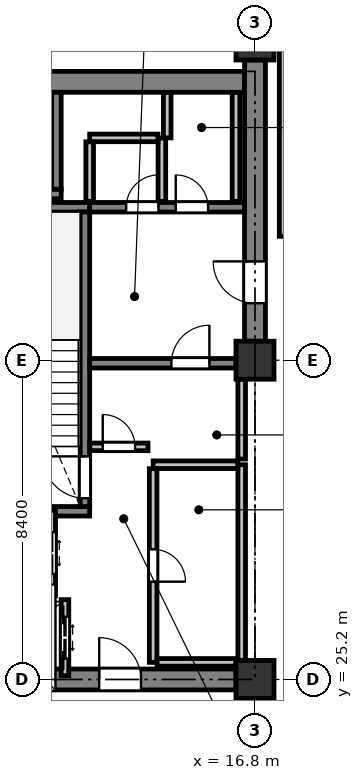
"""IFC4 building model, lengths in metres.
Left out: names, types, materials, properties, quantities, classifications, styles, units other than length and angle.
Written with IfcOpenShell. Run it as: python <this file> out.ifc"""

import sys

from ifc_helpers import new_model, si_unit, direction, frame, frame_2d, origin, origin_2d, place, context, subcontext, project, spatial, rectangle, extrude, element, fill, save


model = new_model("IFC4")
c1 = context("Model", 3, precision=1e-05, world=origin(), true_north=direction((0.0, 1.0)))
c2 = subcontext(c1, "Body", "Model", "MODEL_VIEW")
j1 = project(units=[si_unit("LENGTHUNIT", "METRE"), si_unit("PLANEANGLEUNIT", "RADIAN")], contexts=[c1])
p1 = place(None, origin())
s1 = spatial("IfcSite", under=j1, at=p1, CompositionType="ELEMENT")
p2 = place(p1, origin())
s2 = spatial("IfcBuilding", under=s1, at=p2, CompositionType="ELEMENT")
p3 = place(p2, frame((0.0, 0.0, 171.4)))
s3 = spatial("IfcBuildingStorey", under=s2, at=p3, CompositionType="ELEMENT", Elevation=171.4)
for number, where, z_axis, x_axis in (
    (1, (16.8, 25.2, 0.0), (0.0, 0.0, 1.0), (1.0, 0.0, 0.0)),
    (2, (16.8, 33.6, 0.0), (0.0, 0.0, 1.0), (1.0, 0.0, 0.0)),
    (3, (16.8, 42.0, 0.0), (0.0, 0.0, 1.0), (1.0, 0.0, 0.0)),
):
    element("IfcColumn", number, at=place(p3, frame(where, z_axis=z_axis, x_axis=x_axis)), inside=s3, PredefinedType="COLUMN", context=c2, shape_type="SweptSolid", body=[
        extrude(rectangle(XDim=1.0, YDim=1.0, at=origin_2d()), origin(), (0.0, 0.0, 1.0), 4.1),
    ])
p4 = place(p3, frame((8.675, 40.925, 0.0), z_axis=(0.0, 0.0, 1.0), x_axis=(1.0, 0.0, 0.0)))
e4 = element("IfcWall", 4, at=p4, inside=s3, PredefinedType="SHEAR", context=c2, shape_type="SweptSolid", body=[
    extrude(rectangle(XDim=7.85, YDim=0.55, at=frame_2d((3.925, 0.0))), origin(), (0.0, 0.0, 1.0), 3.825),
])
p5 = place(p3, frame((16.8, 34.1, 0.0), z_axis=(0.0, 0.0, 1.0), x_axis=(0.0, 1.0, 0.0)))
e5 = element("IfcWall", 5, at=p5, inside=s3, PredefinedType="SHEAR", context=c2, shape_type="SweptSolid", body=[
    extrude(rectangle(XDim=7.4, YDim=0.55, at=frame_2d((3.7, 0.0))), origin(), (0.0, 0.0, 1.0), 3.825),
])
p6 = place(p5, frame((1.0, 0.0, 0.0)))
e6 = element("IfcOpeningElement", 6, at=p6, cuts=e5, PredefinedType="OPENING", context=c2, shape_type="SweptSolid", body=[
    extrude(rectangle(XDim=1.1, YDim=2.15, at=frame_2d((0.55, 1.075))), frame((0.0, 0.285, 0.0), z_axis=(0.0, -1.0, 0.0), x_axis=(1.0, 0.0, 0.0)), (0.0, 0.0, 1.0), 0.57),
])
p7 = place(p3, frame((8.9, 25.2, 0.0), z_axis=(0.0, 0.0, 1.0), x_axis=(1.0, 0.0, 0.0)))
e7 = element("IfcWall", 7, at=p7, inside=s3, PredefinedType="SHEAR", context=c2, shape_type="SweptSolid", body=[
    extrude(rectangle(XDim=7.4, YDim=0.55, at=frame_2d((3.7, 0.0))), origin(), (0.0, 0.0, 1.0), 3.825),
])
p8 = place(p7, frame((3.8, 0.0, 0.0)))
e8 = element("IfcOpeningElement", 8, at=p8, cuts=e7, PredefinedType="OPENING", context=c2, shape_type="SweptSolid", body=[
    extrude(rectangle(XDim=1.1, YDim=2.15, at=frame_2d((0.55, 1.075))), frame((0.0, 0.285, 0.0), z_axis=(0.0, -1.0, 0.0), x_axis=(1.0, 0.0, 0.0)), (0.0, 0.0, 1.0), 0.57),
])
for number, where, z_axis, x_axis in (
    (9, (12.45, 29.625, 0.0), (0.0, 0.0, 1.0), (-1.0, 0.0, 0.0)),
    (10, (12.45, 37.625, 0.0), (0.0, 0.0, 1.0), (-1.0, 0.0, 0.0)),
):
    element("IfcWall", number, at=place(p3, frame(where, z_axis=z_axis, x_axis=x_axis)), inside=s3, PredefinedType="SHEAR", context=c2, shape_type="SweptSolid", body=[
        extrude(rectangle(XDim=3.75, YDim=0.25, at=frame_2d((1.875, 0.0))), origin(), (0.0, 0.0, 1.0), 3.825),
    ])
p9 = place(p3, frame((12.325, 29.75, 0.0), z_axis=(0.0, 0.0, 1.0), x_axis=(0.0, 1.0, 0.0)))
e11 = element("IfcWall", 11, at=p9, inside=s3, PredefinedType="SHEAR", context=c2, shape_type="SweptSolid", body=[
    extrude(rectangle(XDim=7.75, YDim=0.25, at=frame_2d((3.875, 0.0))), origin(), (0.0, 0.0, 1.0), 3.825),
])
p10 = place(p9, frame((0.22, 0.0, 0.0)))
e12 = element("IfcOpeningElement", 12, at=p10, cuts=e11, PredefinedType="OPENING", context=c2, shape_type="SweptSolid", body=[
    extrude(rectangle(XDim=1.1, YDim=2.15, at=frame_2d((0.55, 1.075))), frame((0.0, 0.135, 0.0), z_axis=(0.0, -1.0, 0.0), x_axis=(1.0, 0.0, 0.0)), (0.0, 0.0, 1.0), 0.27),
])
p11 = place(p3, frame((8.675, 37.975, 0.0), z_axis=(0.0, 0.0, 1.0), x_axis=(1.0, 0.0, 0.0)))
e13 = element("IfcWall", 13, at=p11, inside=s3, PredefinedType="SHEAR", context=c2, shape_type="SweptSolid", body=[
    extrude(rectangle(XDim=3.025, YDim=0.25, at=frame_2d((1.512, 0.0))), origin(), (0.0, 0.0, 1.0), 3.825),
])
p12 = place(p3, frame((11.575, 38.1, 0.0), z_axis=(0.0, 0.0, 1.0), x_axis=(0.0, 1.0, 0.0)))
e14 = element("IfcWall", 14, at=p12, inside=s3, PredefinedType="SHEAR", context=c2, shape_type="SweptSolid", body=[
    extrude(rectangle(XDim=2.55, YDim=0.25, at=frame_2d((1.275, 0.0))), origin(), (0.0, 0.0, 1.0), 3.825),
])
p13 = place(p3, frame((12.45, 33.52, 0.0), z_axis=(0.0, 0.0, 1.0), x_axis=(1.0, 0.0, 0.0)))
e15 = element("IfcWall", 15, at=p13, inside=s3, PredefinedType="SHEAR", context=c2, shape_type="SweptSolid", body=[
    extrude(rectangle(XDim=3.85, YDim=0.25, at=frame_2d((1.925, 0.0))), origin(), (0.0, 0.0, 1.0), 3.825),
])
p14 = place(p13, frame((2.15, 0.0, 0.0)))
e16 = element("IfcOpeningElement", 16, at=p14, cuts=e15, PredefinedType="OPENING", context=c2, shape_type="SweptSolid", body=[
    extrude(rectangle(XDim=1.0, YDim=2.15, at=frame_2d((0.5, 1.075))), frame((0.0, 0.135, 0.0), z_axis=(0.0, -1.0, 0.0), x_axis=(1.0, 0.0, 0.0)), (0.0, 0.0, 1.0), 0.27),
])
p15 = place(p3, frame((12.45, 37.625, 0.0), z_axis=(0.0, 0.0, 1.0), x_axis=(1.0, 0.0, 0.0)))
e17 = element("IfcWall", 17, at=p15, inside=s3, PredefinedType="SHEAR", context=c2, shape_type="SweptSolid", body=[
    extrude(rectangle(XDim=4.075, YDim=0.25, at=frame_2d((2.038, 0.0))), origin(), (0.0, 0.0, 1.0), 3.825),
])
p16 = place(p15, frame((0.96, 0.0, 0.0)))
e18 = element("IfcOpeningElement", 18, at=p16, cuts=e17, PredefinedType="OPENING", context=c2, shape_type="SweptSolid", body=[
    extrude(rectangle(XDim=0.85, YDim=2.15, at=frame_2d((0.425, 1.075))), frame((0.0, 0.135, 0.0), z_axis=(0.0, -1.0, 0.0), x_axis=(1.0, 0.0, 0.0)), (0.0, 0.0, 1.0), 0.27),
])
p17 = place(p15, frame((2.264, 0.0, 0.0)))
e19 = element("IfcOpeningElement", 19, at=p17, cuts=e17, PredefinedType="OPENING", context=c2, shape_type="SweptSolid", body=[
    extrude(rectangle(XDim=0.85, YDim=2.15, at=frame_2d((0.425, 1.075))), frame((0.0, 0.135, 0.0), z_axis=(0.0, -1.0, 0.0), x_axis=(1.0, 0.0, 0.0)), (0.0, 0.0, 1.0), 0.27),
])
p18 = place(p3, frame((11.45, 27.4, 0.0), z_axis=(0.0, 0.0, 1.0), x_axis=(0.0, 1.0, 0.0)))
e20 = element("IfcWall", 20, at=p18, inside=s3, PredefinedType="PARTITIONING", context=c2, shape_type="SweptSolid", body=[
    extrude(rectangle(XDim=2.25, YDim=0.2, at=frame_2d((1.125, 0.0))), origin(), (0.0, 0.0, 1.0), 3.825),
])
p19 = place(p18, frame((0.575, 0.0, 0.0)))
e21 = element("IfcOpeningElement", 21, at=p19, cuts=e20, PredefinedType="OPENING", context=c2, shape_type="SweptSolid", body=[
    extrude(rectangle(XDim=1.1, YDim=2.2, at=frame_2d((0.55, 1.1))), frame((0.0, 0.11, 0.0), z_axis=(0.0, -1.0, 0.0), x_axis=(1.0, 0.0, 0.0)), (0.0, 0.0, 1.0), 0.22),
])
p20 = place(p3, frame((11.8, 25.3, 0.0), z_axis=(0.0, 0.0, 1.0), x_axis=(0.0, 1.0, 0.0)))
e22 = element("IfcWall", 22, at=p20, inside=s3, PredefinedType="PARTITIONING", context=c2, shape_type="SweptSolid", body=[
    extrude(rectangle(XDim=2.0, YDim=0.2, at=frame_2d((1.0, 0.0))), origin(), (0.0, 0.0, 1.0), 3.825),
])
p21 = place(p20, frame((0.45, 0.0, 0.0)))
e23 = element("IfcOpeningElement", 23, at=p21, cuts=e22, PredefinedType="OPENING", context=c2, shape_type="SweptSolid", body=[
    extrude(rectangle(XDim=1.1, YDim=2.2, at=frame_2d((0.55, 1.1))), frame((0.0, 0.11, 0.0), z_axis=(0.0, -1.0, 0.0), x_axis=(1.0, 0.0, 0.0)), (0.0, 0.0, 1.0), 0.22),
])
p22 = place(p3, frame((16.45, 25.705, 0.0), z_axis=(0.0, 0.0, 1.0), x_axis=(0.0, 1.0, 0.0)))
e24 = element("IfcWall", 24, at=p22, inside=s3, PredefinedType="PARTITIONING", context=c2, shape_type="SweptSolid", body=[
    extrude(rectangle(XDim=5.145, YDim=0.2, at=frame_2d((2.573, 0.0))), origin(), (0.0, 0.0, 1.0), 3.825),
])
p23 = place(p3, frame((16.346, 30.85, 0.0), z_axis=(0.0, 0.0, 1.0), x_axis=(-1.0, 0.0, 0.0)))
e25 = element("IfcWall", 25, at=p23, inside=s3, PredefinedType="PARTITIONING", context=c2, shape_type="SweptSolid", body=[
    extrude(rectangle(XDim=2.226, YDim=0.2, at=frame_2d((1.113, 0.0))), origin(), (0.0, 0.0, 1.0), 3.825),
])
p24 = place(p3, frame((14.12, 30.746, 0.0), z_axis=(0.0, 0.0, 1.0), x_axis=(0.0, -1.0, 0.0)))
e26 = element("IfcWall", 26, at=p24, inside=s3, PredefinedType="PARTITIONING", context=c2, shape_type="SweptSolid", body=[
    extrude(rectangle(XDim=5.096, YDim=0.2, at=frame_2d((2.548, 0.0))), origin(), (0.0, 0.0, 1.0), 3.825),
])
p25 = place(p24, frame((2.123, 0.0, 0.0)))
e27 = element("IfcOpeningElement", 27, at=p25, cuts=e26, PredefinedType="OPENING", context=c2, shape_type="SweptSolid", body=[
    extrude(rectangle(XDim=0.85, YDim=2.15, at=frame_2d((0.425, 1.075))), frame((0.0, 0.11, 0.0), z_axis=(0.0, -1.0, 0.0), x_axis=(1.0, 0.0, 0.0)), (0.0, 0.0, 1.0), 0.22),
])
p26 = place(p3, frame((14.224, 25.65, 0.0), z_axis=(0.0, 0.0, 1.0), x_axis=(1.0, 0.0, 0.0)))
e28 = element("IfcWall", 28, at=p26, inside=s3, PredefinedType="PARTITIONING", context=c2, shape_type="SweptSolid", body=[
    extrude(rectangle(XDim=2.071, YDim=0.2, at=frame_2d((1.035, 0.0))), origin(), (0.0, 0.0, 1.0), 3.825),
])
p27 = place(p3, frame((12.454, 31.32, 0.0), z_axis=(0.0, 0.0, 1.0), x_axis=(0.999999949061, -0.000319182876, 0.0)))
e29 = element("IfcWall", 29, at=p27, inside=s3, PredefinedType="PARTITIONING", context=c2, shape_type="SweptSolid", body=[
    extrude(rectangle(XDim=1.53, YDim=0.2, at=frame_2d((0.765, 0.0))), origin(), (0.0, 0.0, 1.0), 3.825),
])
p28 = place(p27, frame((0.34, 0.0, 0.0)))
e30 = element("IfcOpeningElement", 30, at=p28, cuts=e29, PredefinedType="OPENING", context=c2, shape_type="SweptSolid", body=[
    extrude(rectangle(XDim=0.85, YDim=2.15, at=frame_2d((0.425, 1.075))), frame((0.0, 0.11, 0.0), z_axis=(0.0, -1.0, 0.0), x_axis=(1.0, 0.0, 0.0)), (0.0, 0.0, 1.0), 0.22),
])
p29 = place(p3, frame((16.45, 31.0, 0.0), z_axis=(0.0, 0.0, 1.0), x_axis=(0.0, 1.0, 0.0)))
e31 = element("IfcWall", 31, at=p29, inside=s3, PredefinedType="PARTITIONING", context=c2, shape_type="SweptSolid", body=[
    extrude(rectangle(XDim=2.095, YDim=0.2, at=frame_2d((1.047, 0.0))), origin(), (0.0, 0.0, 1.0), 3.825),
])
p30 = place(p3, frame((14.35, 37.78, 0.0), z_axis=(0.0, 0.0, 1.0), x_axis=(0.0, 1.0, 0.0)))
e32 = element("IfcWall", 32, at=p30, inside=s3, PredefinedType="PARTITIONING", context=c2, shape_type="SweptSolid", body=[
    extrude(rectangle(XDim=1.67, YDim=0.2, at=frame_2d((0.835, 0.0))), origin(), (0.0, 0.0, 1.0), 2.875),
])
p31 = place(p3, frame((14.246, 39.45, 0.0), z_axis=(0.0, 0.0, 1.0), x_axis=(-1.0, 0.0, 0.0)))
e33 = element("IfcWall", 33, at=p31, inside=s3, PredefinedType="PARTITIONING", context=c2, shape_type="SweptSolid", body=[
    extrude(rectangle(XDim=1.796, YDim=0.2, at=frame_2d((0.898, 0.0))), origin(), (0.0, 0.0, 1.0), 2.875),
])
p32 = place(p3, frame((12.45, 39.346, 0.0), z_axis=(0.0, 0.0, 1.0), x_axis=(0.0, -1.0, 0.0)))
e34 = element("IfcWall", 34, at=p32, inside=s3, PredefinedType="PARTITIONING", context=c2, shape_type="SweptSolid", body=[
    extrude(rectangle(XDim=1.566, YDim=0.2, at=frame_2d((0.783, 0.0))), origin(), (0.0, 0.0, 1.0), 2.875),
])
p33 = place(p3, frame((16.3, 37.78, 0.0), z_axis=(0.0, 0.0, 1.0), x_axis=(0.0, 1.0, 0.0)))
e35 = element("IfcWall", 35, at=p33, inside=s3, PredefinedType="PARTITIONING", context=c2, shape_type="SweptSolid", body=[
    extrude(rectangle(XDim=2.866, YDim=0.2, at=frame_2d((1.433, 0.0))), origin(), (0.0, 0.0, 1.0), 2.875),
])
p34 = place(p3, frame((14.49, 40.646, 0.0), z_axis=(0.0, 0.0, 1.0), x_axis=(0.0, -1.0, 0.0)))
e36 = element("IfcWall", 36, at=p34, inside=s3, PredefinedType="PARTITIONING", context=c2, shape_type="SweptSolid", body=[
    extrude(rectangle(XDim=1.196, YDim=0.2, at=frame_2d((0.598, 0.0))), origin(), (0.0, 0.0, 1.0), 2.875),
])
p35 = place(p3, frame((17.54, 36.86, 0.0), z_axis=(0.0, 0.0, 1.0), x_axis=(0.0, 1.0, 0.0)))
e37 = element("IfcWall", 37, at=p35, inside=s3, PredefinedType="PARTITIONING", context=c2, shape_type="SweptSolid", body=[
    extrude(rectangle(XDim=6.14, YDim=0.2, at=frame_2d((3.07, 0.0))), origin(), (0.0, 0.0, 1.0), 3.365),
])
p36 = place(p6, origin())
e38 = element("IfcDoor", 38, at=p36, inside=s3, OperationType="SINGLE_SWING_RIGHT", PredefinedType="DOOR", context=c2, shape_type="SweptSolid", body=[
    extrude(rectangle(XDim=1.1, YDim=2.15, at=frame_2d((0.55, 1.075))), frame((0.0, 0.025, 0.0), z_axis=(0.0, -1.0, 0.0), x_axis=(1.0, 0.0, 0.0)), (0.0, 0.0, 1.0), 0.05),
])
fill(e6, e38)
p37 = place(p8, origin())
e39 = element("IfcDoor", 39, at=p37, inside=s3, OperationType="SINGLE_SWING_LEFT", PredefinedType="DOOR", context=c2, shape_type="SweptSolid", body=[
    extrude(rectangle(XDim=1.1, YDim=2.15, at=frame_2d((0.55, 1.075))), frame((0.0, 0.025, 0.0), z_axis=(0.0, -1.0, 0.0), x_axis=(1.0, 0.0, 0.0)), (0.0, 0.0, 1.0), 0.05),
])
fill(e8, e39)
p38 = place(p10, origin())
e40 = element("IfcDoor", 40, at=p38, inside=s3, OperationType="SINGLE_SWING_RIGHT", PredefinedType="DOOR", context=c2, shape_type="SweptSolid", body=[
    extrude(rectangle(XDim=1.1, YDim=2.15, at=frame_2d((0.55, 1.075))), frame((0.0, 0.025, 0.0), z_axis=(0.0, -1.0, 0.0), x_axis=(1.0, 0.0, 0.0)), (0.0, 0.0, 1.0), 0.05),
])
fill(e12, e40)
p39 = place(p14, origin())
e41 = element("IfcDoor", 41, at=p39, inside=s3, OperationType="SINGLE_SWING_RIGHT", PredefinedType="DOOR", context=c2, shape_type="SweptSolid", body=[
    extrude(rectangle(XDim=1.0, YDim=2.15, at=frame_2d((0.5, 1.075))), frame((0.0, 0.025, 0.0), z_axis=(0.0, -1.0, 0.0), x_axis=(1.0, 0.0, 0.0)), (0.0, 0.0, 1.0), 0.05),
])
fill(e16, e41)
p40 = place(p19, origin())
e42 = element("IfcDoor", 42, at=p40, inside=s3, OperationType="DOUBLE_DOOR_SLIDING", PredefinedType="DOOR", context=c2, shape_type="SweptSolid", body=[
    extrude(rectangle(XDim=1.1, YDim=2.2, at=frame_2d((0.55, 1.1))), frame((0.0, 0.025, 0.0), z_axis=(0.0, -1.0, 0.0), x_axis=(1.0, 0.0, 0.0)), (0.0, 0.0, 1.0), 0.05),
])
fill(e21, e42)
p41 = place(p21, origin())
e43 = element("IfcDoor", 43, at=p41, inside=s3, OperationType="DOUBLE_DOOR_SLIDING", PredefinedType="DOOR", context=c2, shape_type="SweptSolid", body=[
    extrude(rectangle(XDim=1.1, YDim=2.2, at=frame_2d((0.55, 1.1))), frame((0.0, 0.025, 0.0), z_axis=(0.0, -1.0, 0.0), x_axis=(1.0, 0.0, 0.0)), (0.0, 0.0, 1.0), 0.05),
])
fill(e23, e43)
p42 = place(p25, origin())
e44 = element("IfcDoor", 44, at=p42, inside=s3, OperationType="SINGLE_SWING_RIGHT", PredefinedType="DOOR", context=c2, shape_type="SweptSolid", body=[
    extrude(rectangle(XDim=0.85, YDim=2.15, at=frame_2d((0.425, 1.075))), frame((0.0, 0.025, 0.0), z_axis=(0.0, -1.0, 0.0), x_axis=(1.0, 0.0, 0.0)), (0.0, 0.0, 1.0), 0.05),
])
fill(e27, e44)
p43 = place(p28, origin())
e45 = element("IfcDoor", 45, at=p43, inside=s3, OperationType="SINGLE_SWING_LEFT", PredefinedType="DOOR", context=c2, shape_type="SweptSolid", body=[
    extrude(rectangle(XDim=0.85, YDim=2.15, at=frame_2d((0.425, 1.075))), frame((0.0, 0.025, 0.0), z_axis=(0.0, -1.0, 0.0), x_axis=(1.0, 0.0, 0.0)), (0.0, 0.0, 1.0), 0.05),
])
fill(e30, e45)
p44 = place(p16, origin())
e46 = element("IfcDoor", 46, at=p44, inside=s3, OperationType="SINGLE_SWING_RIGHT", PredefinedType="DOOR", context=c2, shape_type="SweptSolid", body=[
    extrude(rectangle(XDim=0.85, YDim=2.15, at=frame_2d((0.425, 1.075))), frame((0.0, 0.025, 0.0), z_axis=(0.0, -1.0, 0.0), x_axis=(1.0, 0.0, 0.0)), (0.0, 0.0, 1.0), 0.05),
])
fill(e18, e46)
p45 = place(p17, origin())
e47 = element("IfcDoor", 47, at=p45, inside=s3, OperationType="SINGLE_SWING_LEFT", PredefinedType="DOOR", context=c2, shape_type="SweptSolid", body=[
    extrude(rectangle(XDim=0.85, YDim=2.15, at=frame_2d((0.425, 1.075))), frame((0.0, 0.025, 0.0), z_axis=(0.0, -1.0, 0.0), x_axis=(1.0, 0.0, 0.0)), (0.0, 0.0, 1.0), 0.05),
])
fill(e19, e47)
save(model, sys.argv[1])
